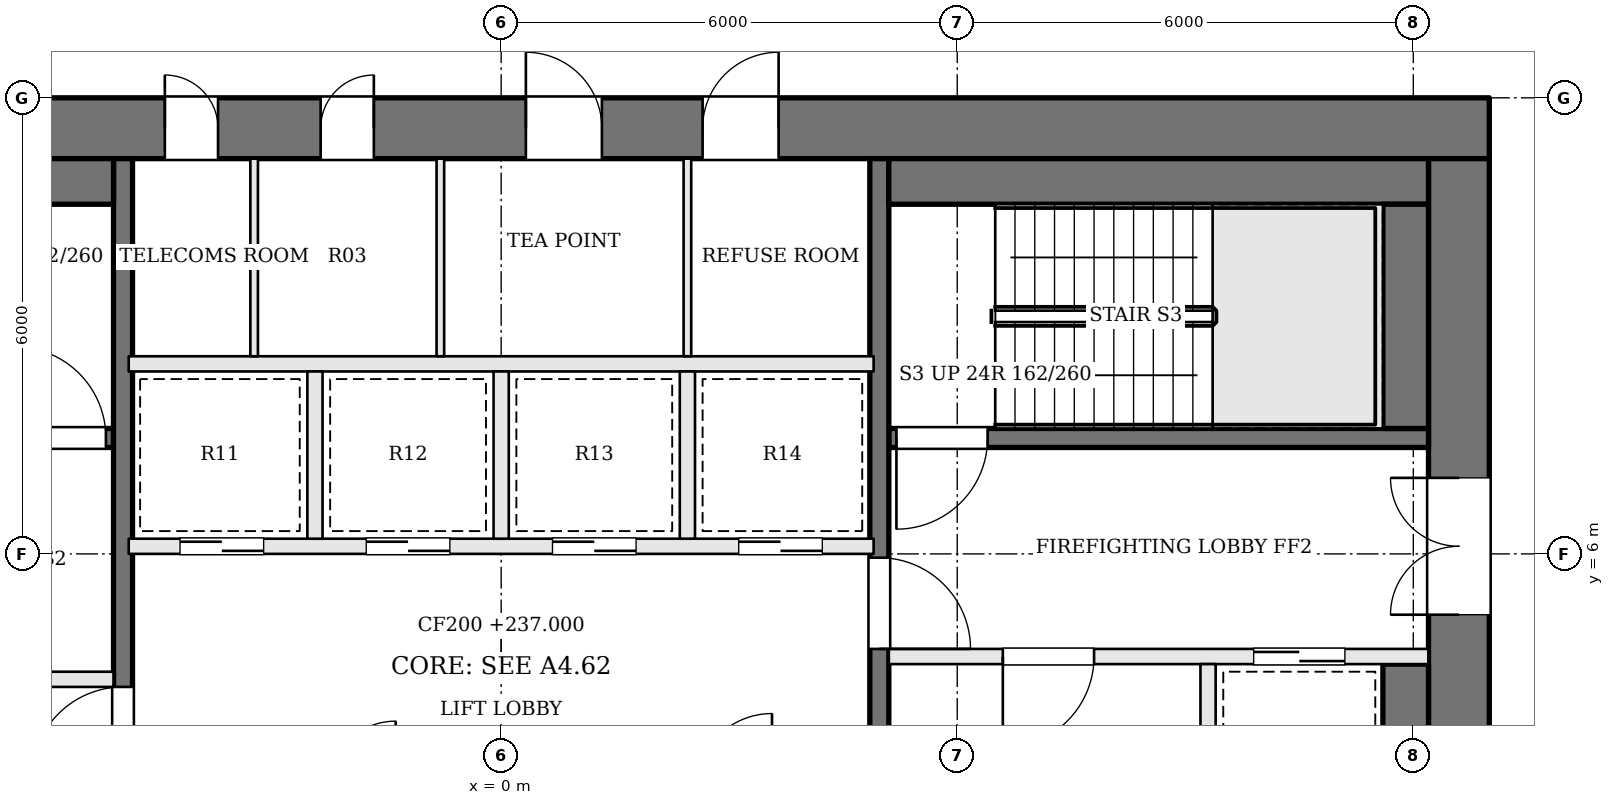
"""IFC4 building model, lengths in metres.
Left out: names, types, materials, properties, quantities, classifications, styles, units other than length and angle.
Written with IfcOpenShell. Run it as: python <this file> out.ifc"""

import sys

from ifc_helpers import new_model, si_unit, direction, frame, frame_2d, origin, place, context, subcontext, project, spatial, rectangle, extrude, element, fill, save


model = new_model("IFC4")
c1 = context("Model", 3, precision=1e-05, world=origin(), true_north=direction((0.0, 1.0)))
c2 = subcontext(c1, "Body", "Model", "MODEL_VIEW")
j1 = project(units=[si_unit("LENGTHUNIT", "METRE"), si_unit("PLANEANGLEUNIT", "RADIAN")], contexts=[c1])
p1 = place(None, origin())
s1 = spatial("IfcSite", under=j1, at=p1, CompositionType="ELEMENT")
p2 = place(p1, origin())
s2 = spatial("IfcBuilding", under=s1, at=p2, CompositionType="ELEMENT")
p3 = place(p2, frame((0.0, 0.0, 237.0)))
s3 = spatial("IfcBuildingStorey", under=s2, at=p3, CompositionType="ELEMENT", Elevation=237.0)
p4 = place(p3, frame((-13.0, 11.6, 0.0), z_axis=(0.0, 0.0, 1.0), x_axis=(1.0, 0.0, 0.0)))
e1 = element("IfcWall", 1, at=p4, inside=s3, PredefinedType="SHEAR", context=c2, shape_type="SweptSolid", body=[
    extrude(rectangle(XDim=26.0, YDim=0.8, at=frame_2d((13.0, 0.0))), origin(), (0.0, 0.0, 1.0), 3.9),
])
p5 = place(p4, frame((8.575, 0.0, 0.0)))
e2 = element("IfcOpeningElement", 2, at=p5, cuts=e1, PredefinedType="OPENING", context=c2, shape_type="SweptSolid", body=[
    extrude(rectangle(XDim=0.7, YDim=2.1, at=frame_2d((0.35, 1.05))), frame((0.0, 0.41, 0.0), z_axis=(0.0, -1.0, 0.0), x_axis=(1.0, 0.0, 0.0)), (0.0, 0.0, 1.0), 0.82),
])
p6 = place(p4, frame((10.625, 0.0, 0.0)))
e3 = element("IfcOpeningElement", 3, at=p6, cuts=e1, PredefinedType="OPENING", context=c2, shape_type="SweptSolid", body=[
    extrude(rectangle(XDim=0.7, YDim=2.1, at=frame_2d((0.35, 1.05))), frame((0.0, 0.41, 0.0), z_axis=(0.0, -1.0, 0.0), x_axis=(1.0, 0.0, 0.0)), (0.0, 0.0, 1.0), 0.82),
])
p7 = place(p4, frame((13.325, 0.0, 0.0)))
e4 = element("IfcOpeningElement", 4, at=p7, cuts=e1, PredefinedType="OPENING", context=c2, shape_type="SweptSolid", body=[
    extrude(rectangle(XDim=1.0, YDim=2.1, at=frame_2d((0.5, 1.05))), frame((0.0, 0.41, 0.0), z_axis=(0.0, -1.0, 0.0), x_axis=(1.0, 0.0, 0.0)), (0.0, 0.0, 1.0), 0.82),
])
p8 = place(p4, frame((15.65, 0.0, 0.0)))
e5 = element("IfcOpeningElement", 5, at=p8, cuts=e1, PredefinedType="OPENING", context=c2, shape_type="SweptSolid", body=[
    extrude(rectangle(XDim=1.0, YDim=2.1, at=frame_2d((0.5, 1.05))), frame((0.0, 0.41, 0.0), z_axis=(0.0, -1.0, 0.0), x_axis=(1.0, 0.0, 0.0)), (0.0, 0.0, 1.0), 0.82),
])
p9 = place(p3, frame((12.6, -2.2, 0.0), z_axis=(0.0, 0.0, 1.0), x_axis=(0.0, 1.0, 0.0)))
e6 = element("IfcWall", 6, at=p9, inside=s3, PredefinedType="SHEAR", context=c2, shape_type="SweptSolid", body=[
    extrude(rectangle(XDim=13.4, YDim=0.8, at=frame_2d((6.7, 0.0))), origin(), (0.0, 0.0, 1.0), 3.9),
])
p10 = place(p9, frame((7.4, 0.0, 0.0)))
e7 = element("IfcOpeningElement", 7, at=p10, cuts=e6, PredefinedType="OPENING", context=c2, shape_type="SweptSolid", body=[
    extrude(rectangle(XDim=1.8, YDim=2.1, at=frame_2d((0.9, 1.05))), frame((0.0, 0.41, 0.0), z_axis=(0.0, -1.0, 0.0), x_axis=(1.0, 0.0, 0.0)), (0.0, 0.0, 1.0), 0.82),
])
p11 = place(p3, frame((12.2, 7.525, 0.0), z_axis=(0.0, 0.0, 1.0), x_axis=(-1.0, 0.0, 0.0)))
e8 = element("IfcWall", 8, at=p11, inside=s3, PredefinedType="SOLIDWALL", context=c2, shape_type="SweptSolid", body=[
    extrude(rectangle(XDim=7.1, YDim=0.25, at=frame_2d((3.55, 0.0))), origin(), (0.0, 0.0, 1.0), 3.7),
])
p12 = place(p11, frame((5.8, 0.0, 0.0)))
e9 = element("IfcOpeningElement", 9, at=p12, cuts=e8, PredefinedType="OPENING", context=c2, shape_type="SweptSolid", body=[
    extrude(rectangle(XDim=1.2, YDim=2.1, at=frame_2d((0.6, 1.05))), frame((0.0, 0.135, 0.0), z_axis=(0.0, -1.0, 0.0), x_axis=(1.0, 0.0, 0.0)), (0.0, 0.0, 1.0), 0.27),
])
p13 = place(p3, frame((-12.2, 4.35, 0.0), z_axis=(0.0, 0.0, 1.0), x_axis=(1.0, 0.0, 0.0)))
e10 = element("IfcWall", 10, at=p13, inside=s3, PredefinedType="SOLIDWALL", context=c2, shape_type="SweptSolid", body=[
    extrude(rectangle(XDim=7.1, YDim=0.2, at=frame_2d((3.55, 0.0))), origin(), (0.0, 0.0, 1.0), 3.7),
])
p14 = place(p13, frame((4.4, 0.0, 0.0)))
e11 = element("IfcOpeningElement", 11, at=p14, cuts=e10, PredefinedType="OPENING", context=c2, shape_type="SweptSolid", body=[
    extrude(rectangle(XDim=1.2, YDim=2.1, at=frame_2d((0.6, 1.05))), frame((0.0, 0.11, 0.0), z_axis=(0.0, -1.0, 0.0), x_axis=(1.0, 0.0, 0.0)), (0.0, 0.0, 1.0), 0.22),
])
p15 = place(p13, frame((1.1, 0.0, 0.0)))
e12 = element("IfcOpeningElement", 12, at=p15, cuts=e10, PredefinedType="OPENING", context=c2, shape_type="SweptSolid", body=[
    extrude(rectangle(XDim=1.2, YDim=2.1, at=frame_2d((0.6, 1.05))), frame((0.0, 0.11, 0.0), z_axis=(0.0, -1.0, 0.0), x_axis=(1.0, 0.0, 0.0)), (0.0, 0.0, 1.0), 0.22),
])
p16 = place(p3, frame((12.2, 4.65, 0.0), z_axis=(0.0, 0.0, 1.0), x_axis=(-1.0, 0.0, 0.0)))
e13 = element("IfcWall", 13, at=p16, inside=s3, PredefinedType="SOLIDWALL", context=c2, shape_type="SweptSolid", body=[
    extrude(rectangle(XDim=7.1, YDim=0.2, at=frame_2d((3.55, 0.0))), origin(), (0.0, 0.0, 1.0), 3.7),
])
p17 = place(p16, frame((4.4, 0.0, 0.0)))
e14 = element("IfcOpeningElement", 14, at=p17, cuts=e13, PredefinedType="OPENING", context=c2, shape_type="SweptSolid", body=[
    extrude(rectangle(XDim=1.2, YDim=2.1, at=frame_2d((0.6, 1.05))), frame((0.0, 0.11, 0.0), z_axis=(0.0, -1.0, 0.0), x_axis=(1.0, 0.0, 0.0)), (0.0, 0.0, 1.0), 0.22),
])
p18 = place(p16, frame((1.1, 0.0, 0.0)))
e15 = element("IfcOpeningElement", 15, at=p18, cuts=e13, PredefinedType="OPENING", context=c2, shape_type="SweptSolid", body=[
    extrude(rectangle(XDim=1.2, YDim=2.1, at=frame_2d((0.6, 1.05))), frame((0.0, 0.11, 0.0), z_axis=(0.0, -1.0, 0.0), x_axis=(1.0, 0.0, 0.0)), (0.0, 0.0, 1.0), 0.22),
])
p19 = place(p3, frame((-12.2, 7.525, 0.0), z_axis=(0.0, 0.0, 1.0), x_axis=(1.0, 0.0, 0.0)))
e16 = element("IfcWall", 16, at=p19, inside=s3, PredefinedType="SOLIDWALL", context=c2, shape_type="SweptSolid", body=[
    extrude(rectangle(XDim=7.1, YDim=0.25, at=frame_2d((3.55, 0.0))), origin(), (0.0, 0.0, 1.0), 3.7),
])
p20 = place(p19, frame((5.8, 0.0, 0.0)))
e17 = element("IfcOpeningElement", 17, at=p20, cuts=e16, PredefinedType="OPENING", context=c2, shape_type="SweptSolid", body=[
    extrude(rectangle(XDim=1.2, YDim=2.1, at=frame_2d((0.6, 1.05))), frame((0.0, 0.135, 0.0), z_axis=(0.0, -1.0, 0.0), x_axis=(1.0, 0.0, 0.0)), (0.0, 0.0, 1.0), 0.27),
])
p21 = place(p3, frame((9.3, 4.55, 0.0), z_axis=(0.0, 0.0, 1.0), x_axis=(0.0, -1.0, 0.0)))
e18 = element("IfcWall", 18, at=p21, inside=s3, PredefinedType="SOLIDWALL", context=c2, shape_type="SweptSolid", body=[
    extrude(rectangle(XDim=3.0, YDim=0.2, at=frame_2d((1.5, 0.0))), origin(), (0.0, 0.0, 1.0), 3.7),
])
p22 = place(p3, frame((-4.975, -2.2, 0.0), z_axis=(0.0, 0.0, 1.0), x_axis=(0.0, 1.0, 0.0)))
e19 = element("IfcWall", 19, at=p22, inside=s3, PredefinedType="SOLIDWALL", context=c2, shape_type="SweptSolid", body=[
    extrude(rectangle(XDim=13.4, YDim=0.25, at=frame_2d((6.7, 0.0))), origin(), (0.0, 0.0, 1.0), 3.7),
])
p23 = place(p22, frame((5.25, 0.0, 0.0)))
e20 = element("IfcOpeningElement", 20, at=p23, cuts=e19, PredefinedType="OPENING", context=c2, shape_type="SweptSolid", body=[
    extrude(rectangle(XDim=1.2, YDim=2.1, at=frame_2d((0.6, 1.05))), frame((0.0, 0.135, 0.0), z_axis=(0.0, -1.0, 0.0), x_axis=(1.0, 0.0, 0.0)), (0.0, 0.0, 1.0), 0.27),
])
p24 = place(p3, frame((4.975, 11.2, 0.0), z_axis=(0.0, 0.0, 1.0), x_axis=(0.0, -1.0, 0.0)))
e21 = element("IfcWall", 21, at=p24, inside=s3, PredefinedType="SOLIDWALL", context=c2, shape_type="SweptSolid", body=[
    extrude(rectangle(XDim=13.4, YDim=0.25, at=frame_2d((6.7, 0.0))), origin(), (0.0, 0.0, 1.0), 3.7),
])
p25 = place(p24, frame((5.25, 0.0, 0.0)))
e22 = element("IfcOpeningElement", 22, at=p25, cuts=e21, PredefinedType="OPENING", context=c2, shape_type="SweptSolid", body=[
    extrude(rectangle(XDim=1.2, YDim=2.1, at=frame_2d((0.6, 1.05))), frame((0.0, 0.135, 0.0), z_axis=(0.0, -1.0, 0.0), x_axis=(1.0, 0.0, 0.0)), (0.0, 0.0, 1.0), 0.27),
])
for number, where, z_axis, x_axis in (
    (23, (-12.2, 10.9, 0.0), (0.0, 0.0, 1.0), (1.0, 0.0, 0.0)),
    (24, (12.2, 10.9, 0.0), (0.0, 0.0, 1.0), (-1.0, 0.0, 0.0)),
):
    element("IfcWall", number, at=place(p3, frame(where, z_axis=z_axis, x_axis=x_axis)), inside=s3, PredefinedType="SOLIDWALL", context=c2, shape_type="SweptSolid", body=[
        extrude(rectangle(XDim=7.1, YDim=0.6, at=frame_2d((3.55, 0.0))), origin(), (0.0, 0.0, 1.0), 3.7),
    ])
p26 = place(p3, frame((11.9, 10.6, 0.0), z_axis=(0.0, 0.0, 1.0), x_axis=(0.0, -1.0, 0.0)))
e25 = element("IfcWall", 25, at=p26, inside=s3, PredefinedType="SOLIDWALL", context=c2, shape_type="SweptSolid", body=[
    extrude(rectangle(XDim=2.95, YDim=0.6, at=frame_2d((1.475, 0.0))), origin(), (0.0, 0.0, 1.0), 3.7),
])
p27 = place(p3, frame((11.9, 4.55, 0.0), z_axis=(0.0, 0.0, 1.0), x_axis=(0.0, -1.0, 0.0)))
e26 = element("IfcWall", 26, at=p27, inside=s3, PredefinedType="SOLIDWALL", context=c2, shape_type="SweptSolid", body=[
    extrude(rectangle(XDim=3.0, YDim=0.6, at=frame_2d((1.5, 0.0))), origin(), (0.0, 0.0, 1.0), 3.7),
])
p28 = place(p3, frame((-4.9, 6.1, 0.0), z_axis=(0.0, 0.0, 1.0), x_axis=(1.0, 0.0, 0.0)))
e27 = element("IfcWall", 27, at=p28, inside=s3, PredefinedType="SOLIDWALL", context=c2, shape_type="SweptSolid", body=[
    extrude(rectangle(XDim=9.8, YDim=0.2, at=frame_2d((4.9, 0.0))), origin(), (0.0, 0.0, 1.0), 3.7),
])
p29 = place(p28, frame((0.675, 0.0, 0.0)))
e28 = element("IfcOpeningElement", 28, at=p29, cuts=e27, PredefinedType="OPENING", context=c2, shape_type="SweptSolid", body=[
    extrude(rectangle(XDim=1.1, YDim=2.1, at=frame_2d((0.55, 1.05))), frame((0.0, 0.11, 0.0), z_axis=(0.0, -1.0, 0.0), x_axis=(1.0, 0.0, 0.0)), (0.0, 0.0, 1.0), 0.22),
])
p30 = place(p28, frame((3.125, 0.0, 0.0)))
e29 = element("IfcOpeningElement", 29, at=p30, cuts=e27, PredefinedType="OPENING", context=c2, shape_type="SweptSolid", body=[
    extrude(rectangle(XDim=1.1, YDim=2.1, at=frame_2d((0.55, 1.05))), frame((0.0, 0.11, 0.0), z_axis=(0.0, -1.0, 0.0), x_axis=(1.0, 0.0, 0.0)), (0.0, 0.0, 1.0), 0.22),
])
p31 = place(p28, frame((5.575, 0.0, 0.0)))
e30 = element("IfcOpeningElement", 30, at=p31, cuts=e27, PredefinedType="OPENING", context=c2, shape_type="SweptSolid", body=[
    extrude(rectangle(XDim=1.1, YDim=2.1, at=frame_2d((0.55, 1.05))), frame((0.0, 0.11, 0.0), z_axis=(0.0, -1.0, 0.0), x_axis=(1.0, 0.0, 0.0)), (0.0, 0.0, 1.0), 0.22),
])
p32 = place(p28, frame((8.025, 0.0, 0.0)))
e31 = element("IfcOpeningElement", 31, at=p32, cuts=e27, PredefinedType="OPENING", context=c2, shape_type="SweptSolid", body=[
    extrude(rectangle(XDim=1.1, YDim=2.1, at=frame_2d((0.55, 1.05))), frame((0.0, 0.11, 0.0), z_axis=(0.0, -1.0, 0.0), x_axis=(1.0, 0.0, 0.0)), (0.0, 0.0, 1.0), 0.22),
])
p33 = place(p3, frame((-4.9, 8.5, 0.0), z_axis=(0.0, 0.0, 1.0), x_axis=(1.0, 0.0, 0.0)))
e32 = element("IfcWall", 32, at=p33, inside=s3, PredefinedType="SOLIDWALL", context=c2, shape_type="SweptSolid", body=[
    extrude(rectangle(XDim=9.8, YDim=0.2, at=frame_2d((4.9, 0.0))), origin(), (0.0, 0.0, 1.0), 3.7),
])
for number, where, z_axis, x_axis in (
    (33, (-2.45, 6.2, 0.0), (0.0, 0.0, 1.0), (0.0, 1.0, 0.0)),
    (34, (0.0, 6.2, 0.0), (0.0, 0.0, 1.0), (0.0, 1.0, 0.0)),
    (35, (2.45, 6.2, 0.0), (0.0, 0.0, 1.0), (0.0, 1.0, 0.0)),
):
    element("IfcWall", number, at=place(p3, frame(where, z_axis=z_axis, x_axis=x_axis)), inside=s3, PredefinedType="SOLIDWALL", context=c2, shape_type="SweptSolid", body=[
        extrude(rectangle(XDim=2.2, YDim=0.2, at=frame_2d((1.1, 0.0))), origin(), (0.0, 0.0, 1.0), 3.7),
    ])
for number, where, z_axis, x_axis in (
    (36, (-3.25, 8.6, 0.0), (0.0, 0.0, 1.0), (0.0, 1.0, 0.0)),
    (37, (-0.8, 8.6, 0.0), (0.0, 0.0, 1.0), (0.0, 1.0, 0.0)),
    (38, (2.45, 8.6, 0.0), (0.0, 0.0, 1.0), (0.0, 1.0, 0.0)),
):
    element("IfcWall", number, at=place(p3, frame(where, z_axis=z_axis, x_axis=x_axis)), inside=s3, PredefinedType="PARTITIONING", context=c2, shape_type="SweptSolid", body=[
        extrude(rectangle(XDim=2.6, YDim=0.1, at=frame_2d((1.3, 0.0))), origin(), (0.0, 0.0, 1.0), 3.7),
    ])
p34 = place(p10, origin())
e39 = element("IfcDoor", 39, at=p34, inside=s3, OperationType="DOUBLE_DOOR_SINGLE_SWING", PredefinedType="DOOR", context=c2, shape_type="SweptSolid", body=[
    extrude(rectangle(XDim=1.8, YDim=2.1, at=frame_2d((0.9, 1.05))), frame((0.0, 0.025, 0.0), z_axis=(0.0, -1.0, 0.0), x_axis=(1.0, 0.0, 0.0)), (0.0, 0.0, 1.0), 0.05),
])
fill(e7, e39)
p35 = place(p23, origin())
e40 = element("IfcDoor", 40, at=p35, inside=s3, OperationType="SINGLE_SWING_LEFT", PredefinedType="DOOR", context=c2, shape_type="SweptSolid", body=[
    extrude(rectangle(XDim=1.2, YDim=2.1, at=frame_2d((0.6, 1.05))), frame((0.0, 0.025, 0.0), z_axis=(0.0, -1.0, 0.0), x_axis=(1.0, 0.0, 0.0)), (0.0, 0.0, 1.0), 0.05),
])
fill(e20, e40)
p36 = place(p25, origin())
e41 = element("IfcDoor", 41, at=p36, inside=s3, OperationType="SINGLE_SWING_RIGHT", PredefinedType="DOOR", context=c2, shape_type="SweptSolid", body=[
    extrude(rectangle(XDim=1.2, YDim=2.1, at=frame_2d((0.6, 1.05))), frame((0.0, 0.025, 0.0), z_axis=(0.0, -1.0, 0.0), x_axis=(1.0, 0.0, 0.0)), (0.0, 0.0, 1.0), 0.05),
])
fill(e22, e41)
p37 = place(p17, origin())
e42 = element("IfcDoor", 42, at=p37, inside=s3, OperationType="SINGLE_SWING_RIGHT", PredefinedType="DOOR", context=c2, shape_type="SweptSolid", body=[
    extrude(rectangle(XDim=1.2, YDim=2.1, at=frame_2d((0.6, 1.05))), frame((0.0, 0.025, 0.0), z_axis=(0.0, -1.0, 0.0), x_axis=(1.0, 0.0, 0.0)), (0.0, 0.0, 1.0), 0.05),
])
fill(e14, e42)
p38 = place(p12, origin())
e43 = element("IfcDoor", 43, at=p38, inside=s3, OperationType="SINGLE_SWING_RIGHT", PredefinedType="DOOR", context=c2, shape_type="SweptSolid", body=[
    extrude(rectangle(XDim=1.2, YDim=2.1, at=frame_2d((0.6, 1.05))), frame((0.0, 0.025, 0.0), z_axis=(0.0, -1.0, 0.0), x_axis=(1.0, 0.0, 0.0)), (0.0, 0.0, 1.0), 0.05),
])
fill(e9, e43)
p39 = place(p20, origin())
e44 = element("IfcDoor", 44, at=p39, inside=s3, OperationType="SINGLE_SWING_LEFT", PredefinedType="DOOR", context=c2, shape_type="SweptSolid", body=[
    extrude(rectangle(XDim=1.2, YDim=2.1, at=frame_2d((0.6, 1.05))), frame((0.0, 0.025, 0.0), z_axis=(0.0, -1.0, 0.0), x_axis=(1.0, 0.0, 0.0)), (0.0, 0.0, 1.0), 0.05),
])
fill(e17, e44)
p40 = place(p18, origin())
e45 = element("IfcDoor", 45, at=p40, inside=s3, OperationType="SLIDING_TO_RIGHT", PredefinedType="DOOR", context=c2, shape_type="SweptSolid", body=[
    extrude(rectangle(XDim=1.2, YDim=2.1, at=frame_2d((0.6, 1.05))), frame((0.0, 0.025, 0.0), z_axis=(0.0, -1.0, 0.0), x_axis=(1.0, 0.0, 0.0)), (0.0, 0.0, 1.0), 0.05),
])
fill(e15, e45)
p41 = place(p29, origin())
e46 = element("IfcDoor", 46, at=p41, inside=s3, OperationType="SLIDING_TO_RIGHT", PredefinedType="DOOR", context=c2, shape_type="SweptSolid", body=[
    extrude(rectangle(XDim=1.1, YDim=2.1, at=frame_2d((0.55, 1.05))), frame((0.0, 0.025, 0.0), z_axis=(0.0, -1.0, 0.0), x_axis=(1.0, 0.0, 0.0)), (0.0, 0.0, 1.0), 0.05),
])
fill(e28, e46)
p42 = place(p30, origin())
e47 = element("IfcDoor", 47, at=p42, inside=s3, OperationType="SLIDING_TO_LEFT", PredefinedType="DOOR", context=c2, shape_type="SweptSolid", body=[
    extrude(rectangle(XDim=1.1, YDim=2.1, at=frame_2d((0.55, 1.05))), frame((0.0, 0.025, 0.0), z_axis=(0.0, -1.0, 0.0), x_axis=(1.0, 0.0, 0.0)), (0.0, 0.0, 1.0), 0.05),
])
fill(e29, e47)
p43 = place(p31, origin())
e48 = element("IfcDoor", 48, at=p43, inside=s3, OperationType="SLIDING_TO_RIGHT", PredefinedType="DOOR", context=c2, shape_type="SweptSolid", body=[
    extrude(rectangle(XDim=1.1, YDim=2.1, at=frame_2d((0.55, 1.05))), frame((0.0, 0.025, 0.0), z_axis=(0.0, -1.0, 0.0), x_axis=(1.0, 0.0, 0.0)), (0.0, 0.0, 1.0), 0.05),
])
fill(e30, e48)
p44 = place(p32, origin())
e49 = element("IfcDoor", 49, at=p44, inside=s3, OperationType="SLIDING_TO_LEFT", PredefinedType="DOOR", context=c2, shape_type="SweptSolid", body=[
    extrude(rectangle(XDim=1.1, YDim=2.1, at=frame_2d((0.55, 1.05))), frame((0.0, 0.025, 0.0), z_axis=(0.0, -1.0, 0.0), x_axis=(1.0, 0.0, 0.0)), (0.0, 0.0, 1.0), 0.05),
])
fill(e31, e49)
p45 = place(p5, origin())
e50 = element("IfcDoor", 50, at=p45, inside=s3, OperationType="SINGLE_SWING_LEFT", PredefinedType="DOOR", context=c2, shape_type="SweptSolid", body=[
    extrude(rectangle(XDim=0.7, YDim=2.1, at=frame_2d((0.35, 1.05))), frame((0.0, 0.025, 0.0), z_axis=(0.0, -1.0, 0.0), x_axis=(1.0, 0.0, 0.0)), (0.0, 0.0, 1.0), 0.05),
])
fill(e2, e50)
p46 = place(p6, origin())
e51 = element("IfcDoor", 51, at=p46, inside=s3, OperationType="SINGLE_SWING_RIGHT", PredefinedType="DOOR", context=c2, shape_type="SweptSolid", body=[
    extrude(rectangle(XDim=0.7, YDim=2.1, at=frame_2d((0.35, 1.05))), frame((0.0, 0.025, 0.0), z_axis=(0.0, -1.0, 0.0), x_axis=(1.0, 0.0, 0.0)), (0.0, 0.0, 1.0), 0.05),
])
fill(e3, e51)
p47 = place(p7, origin())
e52 = element("IfcDoor", 52, at=p47, inside=s3, OperationType="SINGLE_SWING_LEFT", PredefinedType="DOOR", context=c2, shape_type="SweptSolid", body=[
    extrude(rectangle(XDim=1.0, YDim=2.1, at=frame_2d((0.5, 1.05))), frame((0.0, 0.025, 0.0), z_axis=(0.0, -1.0, 0.0), x_axis=(1.0, 0.0, 0.0)), (0.0, 0.0, 1.0), 0.05),
])
fill(e4, e52)
p48 = place(p8, origin())
e53 = element("IfcDoor", 53, at=p48, inside=s3, OperationType="SINGLE_SWING_RIGHT", PredefinedType="DOOR", context=c2, shape_type="SweptSolid", body=[
    extrude(rectangle(XDim=1.0, YDim=2.1, at=frame_2d((0.5, 1.05))), frame((0.0, 0.025, 0.0), z_axis=(0.0, -1.0, 0.0), x_axis=(1.0, 0.0, 0.0)), (0.0, 0.0, 1.0), 0.05),
])
fill(e5, e53)
save(model, sys.argv[1])
